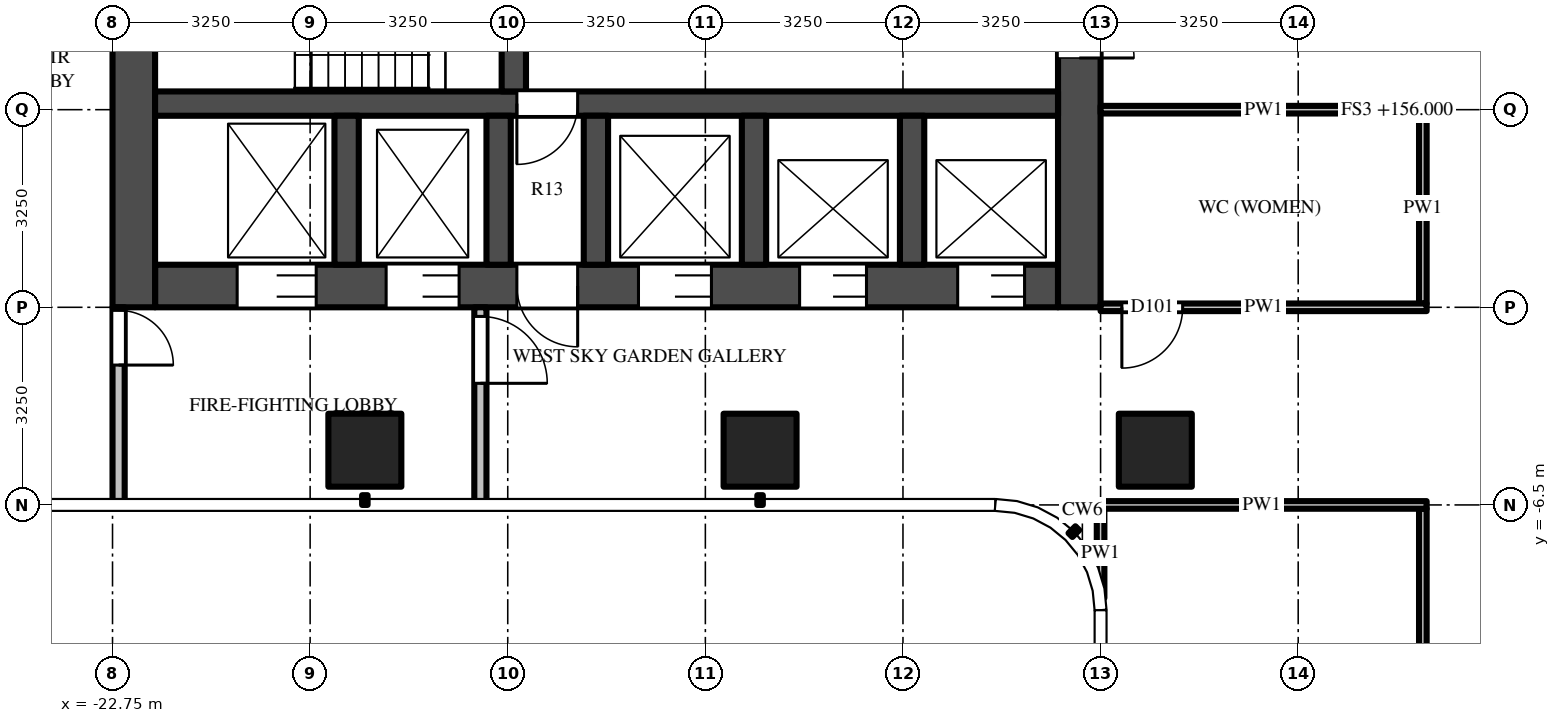
"""IFC4 building model, lengths in metres.
Left out: names, types, materials, properties, quantities, classifications, styles, units other than length and angle.
Written with IfcOpenShell. Run it as: python <this file> out.ifc"""

import sys

from ifc_helpers import new_model, si_unit, direction, frame, frame_2d, origin, origin_2d, place, context, subcontext, project, spatial, rectangle, extrude, source, transform, mapped, element, fill, save


model = new_model("IFC4")
c1 = context("Model", 3, precision=1e-05, world=origin(), true_north=direction((0.0, 1.0)))
c2 = subcontext(c1, "Body", "Model", "MODEL_VIEW")
j1 = project(units=[si_unit("LENGTHUNIT", "METRE"), si_unit("PLANEANGLEUNIT", "RADIAN")], contexts=[c1])
p1 = place(None, origin())
s1 = spatial("IfcSite", under=j1, at=p1, CompositionType="ELEMENT")
p2 = place(p1, origin())
s2 = spatial("IfcBuilding", under=s1, at=p2, CompositionType="ELEMENT")
p3 = place(p2, frame((0.0, 0.0, 156.0)))
s3 = spatial("IfcBuildingStorey", under=s2, at=p3, CompositionType="ELEMENT", Elevation=156.0)
m1 = source(origin(), c2, "Body", "SweptSolid", [
    extrude(rectangle(XDim=1.2, YDim=1.2, at=origin_2d()), origin(), (0.0, 0.0, 1.0), 6.0),
])
for number, where, z_axis, x_axis in (
    (1, (-5.6, -5.6, 0.0), (0.0, 0.0, 1.0), (1.0, 0.0, 0.0)),
    (2, (-12.1, -5.6, 0.0), (0.0, 0.0, 1.0), (1.0, 0.0, 0.0)),
    (3, (-18.6, -5.6, 0.0), (0.0, 0.0, 1.0), (1.0, 0.0, 0.0)),
):
    element("IfcColumn", number, at=place(p3, frame(where, z_axis=z_axis, x_axis=x_axis)), inside=s3, PredefinedType="COLUMN", context=c2, shape_type="MappedRepresentation", body=[
        mapped(m1, transform((0.0, 0.0, 0.0))),
    ])
m2 = source(origin(), c2, "Body", "SweptSolid", [
    extrude(rectangle(XDim=14.85, YDim=0.7, at=frame_2d((7.425, 0.0))), origin(), (0.0, 0.0, 1.0), 5.8),
])
p4 = place(p3, frame((-7.2, -2.9, 0.0), z_axis=(0.0, 0.0, 1.0), x_axis=(-1.0, 0.0, 0.0)))
e4 = element("IfcWall", 4, at=p4, inside=s3, PredefinedType="SHEAR", context=c2, shape_type="MappedRepresentation", body=[
    mapped(m2, transform((0.0, 0.0, 0.0))),
])
m3 = source(origin(), c2, "Body", "SweptSolid", [
    extrude(rectangle(XDim=1.1, YDim=2.1, at=frame_2d((0.55, 1.05))), frame((0.0, 0.36, 0.0), z_axis=(0.0, -1.0, 0.0), x_axis=(1.0, 0.0, 0.0)), (0.0, 0.0, 1.0), 0.72),
])
p5 = place(p4, frame((0.55, 0.0, 0.0)))
e5 = element("IfcOpeningElement", 5, at=p5, cuts=e4, PredefinedType="OPENING", context=c2, shape_type="MappedRepresentation", body=[
    mapped(m3, transform((0.0, 0.0, 0.0))),
])
p6 = place(p4, frame((3.15, 0.0, 0.0)))
e6 = element("IfcOpeningElement", 6, at=p6, cuts=e4, PredefinedType="OPENING", context=c2, shape_type="MappedRepresentation", body=[
    mapped(m3, transform((0.0, 0.0, 0.0))),
])
m4 = source(origin(), c2, "Body", "SweptSolid", [
    extrude(rectangle(XDim=1.2, YDim=2.1, at=frame_2d((0.6, 1.05))), frame((0.0, 0.36, 0.0), z_axis=(0.0, -1.0, 0.0), x_axis=(1.0, 0.0, 0.0)), (0.0, 0.0, 1.0), 0.72),
])
p7 = place(p4, frame((5.7, 0.0, 0.0)))
e7 = element("IfcOpeningElement", 7, at=p7, cuts=e4, PredefinedType="OPENING", context=c2, shape_type="MappedRepresentation", body=[
    mapped(m4, transform((0.0, 0.0, 0.0))),
])
m5 = source(origin(), c2, "Body", "SweptSolid", [
    extrude(rectangle(XDim=1.3, YDim=2.1, at=frame_2d((0.65, 1.05))), frame((0.0, 0.36, 0.0), z_axis=(0.0, -1.0, 0.0), x_axis=(1.0, 0.0, 0.0)), (0.0, 0.0, 1.0), 0.72),
])
p8 = place(p4, frame((12.2, 0.0, 0.0)))
e8 = element("IfcOpeningElement", 8, at=p8, cuts=e4, PredefinedType="OPENING", context=c2, shape_type="MappedRepresentation", body=[
    mapped(m5, transform((0.0, 0.0, 0.0))),
])
p9 = place(p4, frame((9.85, 0.0, 0.0)))
e9 = element("IfcOpeningElement", 9, at=p9, cuts=e4, PredefinedType="OPENING", context=c2, shape_type="MappedRepresentation", body=[
    mapped(m4, transform((0.0, 0.0, 0.0))),
])
m6 = source(origin(), c2, "Body", "SweptSolid", [
    extrude(rectangle(XDim=1.0, YDim=2.1, at=frame_2d((0.5, 1.05))), frame((0.0, 0.36, 0.0), z_axis=(0.0, -1.0, 0.0), x_axis=(1.0, 0.0, 0.0)), (0.0, 0.0, 1.0), 0.72),
])
p10 = place(p4, frame((7.9, 0.0, 0.0)))
e10 = element("IfcOpeningElement", 10, at=p10, cuts=e4, PredefinedType="OPENING", context=c2, shape_type="MappedRepresentation", body=[
    mapped(m6, transform((0.0, 0.0, 0.0))),
])
m7 = source(origin(), c2, "Body", "SweptSolid", [
    extrude(rectangle(XDim=9.05, YDim=0.7, at=frame_2d((4.525, 0.0))), origin(), (0.0, 0.0, 1.0), 5.8),
])
p11 = place(p3, frame((-6.85, 5.8, 0.0), z_axis=(0.0, 0.0, 1.0), x_axis=(0.0, -1.0, 0.0)))
e11 = element("IfcWall", 11, at=p11, inside=s3, PredefinedType="SHEAR", context=c2, shape_type="MappedRepresentation", body=[
    mapped(m7, transform((0.0, 0.0, 0.0))),
])
m8 = source(origin(), c2, "Body", "SweptSolid", [
    extrude(rectangle(XDim=1.8, YDim=2.1, at=frame_2d((0.9, 1.05))), frame((0.0, 0.36, 0.0), z_axis=(0.0, -1.0, 0.0), x_axis=(1.0, 0.0, 0.0)), (0.0, 0.0, 1.0), 0.72),
])
p12 = place(p11, frame((3.15, 0.0, 0.0)))
e12 = element("IfcOpeningElement", 12, at=p12, cuts=e11, PredefinedType="OPENING", context=c2, shape_type="MappedRepresentation", body=[
    mapped(m8, transform((0.0, 0.0, 0.0))),
])
p13 = place(p3, frame((-22.4, 5.8, 0.0), z_axis=(0.0, 0.0, 1.0), x_axis=(0.0, -1.0, 0.0)))
e13 = element("IfcWall", 13, at=p13, inside=s3, PredefinedType="SHEAR", context=c2, shape_type="MappedRepresentation", body=[
    mapped(m7, transform((0.0, 0.0, 0.0))),
])
m9 = source(origin(), c2, "Body", "SweptSolid", [
    extrude(rectangle(XDim=14.85, YDim=0.4, at=frame_2d((7.425, 0.0))), origin(), (0.0, 0.0, 1.0), 5.8),
])
p14 = place(p3, frame((-7.2, 0.1, 0.0), z_axis=(0.0, 0.0, 1.0), x_axis=(-1.0, 0.0, 0.0)))
e14 = element("IfcWall", 14, at=p14, inside=s3, PredefinedType="SHEAR", context=c2, shape_type="MappedRepresentation", body=[
    mapped(m9, transform((0.0, 0.0, 0.0))),
])
m10 = source(origin(), c2, "Body", "SweptSolid", [
    extrude(rectangle(XDim=1.0, YDim=2.1, at=frame_2d((0.5, 1.05))), frame((0.0, 0.21, 0.0), z_axis=(0.0, -1.0, 0.0), x_axis=(1.0, 0.0, 0.0)), (0.0, 0.0, 1.0), 0.42),
])
p15 = place(p14, frame((7.9, 0.0, 0.0)))
e15 = element("IfcOpeningElement", 15, at=p15, cuts=e14, PredefinedType="OPENING", context=c2, shape_type="MappedRepresentation", body=[
    mapped(m10, transform((0.0, 0.0, 0.0))),
])
m11 = source(origin(), c2, "Body", "SweptSolid", [
    extrude(rectangle(XDim=5.5, YDim=0.4, at=frame_2d((2.75, 0.0))), origin(), (0.0, 0.0, 1.0), 5.8),
])
p16 = place(p3, frame((-16.15, 5.8, 0.0), z_axis=(0.0, 0.0, 1.0), x_axis=(0.0, -1.0, 0.0)))
e16 = element("IfcWall", 16, at=p16, inside=s3, PredefinedType="SHEAR", context=c2, shape_type="MappedRepresentation", body=[
    mapped(m11, transform((0.0, 0.0, 0.0))),
])
m12 = source(origin(), c2, "Body", "SweptSolid", [
    extrude(rectangle(XDim=1.1, YDim=2.1, at=frame_2d((0.55, 1.05))), frame((0.0, 0.21, 0.0), z_axis=(0.0, -1.0, 0.0), x_axis=(1.0, 0.0, 0.0)), (0.0, 0.0, 1.0), 0.42),
])
p17 = place(p16, frame((0.725, 0.0, 0.0)))
e17 = element("IfcOpeningElement", 17, at=p17, cuts=e16, PredefinedType="OPENING", context=c2, shape_type="MappedRepresentation", body=[
    mapped(m12, transform((0.0, 0.0, 0.0))),
])
p18 = place(p16, frame((3.675, 0.0, 0.0)))
e18 = element("IfcOpeningElement", 18, at=p18, cuts=e16, PredefinedType="OPENING", context=c2, shape_type="MappedRepresentation", body=[
    mapped(m12, transform((0.0, 0.0, 0.0))),
])
m13 = source(origin(), c2, "Body", "SweptSolid", [
    extrude(rectangle(XDim=2.45, YDim=0.4, at=frame_2d((1.225, 0.0))), origin(), (0.0, 0.0, 1.0), 5.8),
])
for number, where, z_axis, x_axis in (
    (19, (-9.6, -0.1, 0.0), (0.0, 0.0, 1.0), (0.0, -1.0, 0.0)),
    (20, (-12.2, -0.1, 0.0), (0.0, 0.0, 1.0), (0.0, -1.0, 0.0)),
    (21, (-14.8, -0.1, 0.0), (0.0, 0.0, 1.0), (0.0, -1.0, 0.0)),
    (22, (-16.4, -0.1, 0.0), (0.0, 0.0, 1.0), (0.0, -1.0, 0.0)),
    (23, (-18.9, -0.1, 0.0), (0.0, 0.0, 1.0), (0.0, -1.0, 0.0)),
):
    element("IfcWall", number, at=place(p3, frame(where, z_axis=z_axis, x_axis=x_axis)), inside=s3, PredefinedType="SHEAR", context=c2, shape_type="MappedRepresentation", body=[
        mapped(m13, transform((0.0, 0.0, 0.0))),
    ])
m14 = source(origin(), c2, "Body", "SweptSolid", [
    extrude(rectangle(XDim=3.25, YDim=0.2, at=frame_2d((1.625, 0.0))), origin(), (0.0, 0.0, 1.0), 5.8),
])
p19 = place(p3, frame((-16.7, -3.25, 0.0), z_axis=(0.0, 0.0, 1.0), x_axis=(0.0, -1.0, 0.0)))
e24 = element("IfcWall", 24, at=p19, inside=s3, PredefinedType="PARTITIONING", context=c2, shape_type="MappedRepresentation", body=[
    mapped(m14, transform((0.0, 0.0, 0.0))),
])
m15 = source(origin(), c2, "Body", "SweptSolid", [
    extrude(rectangle(XDim=1.1, YDim=2.1, at=frame_2d((0.55, 1.05))), frame((0.0, 0.11, 0.0), z_axis=(0.0, -1.0, 0.0), x_axis=(1.0, 0.0, 0.0)), (0.0, 0.0, 1.0), 0.22),
])
p20 = place(p19, frame((0.15, 0.0, 0.0)))
e25 = element("IfcOpeningElement", 25, at=p20, cuts=e24, PredefinedType="OPENING", context=c2, shape_type="MappedRepresentation", body=[
    mapped(m15, transform((0.0, 0.0, 0.0))),
])
p21 = place(p3, frame((-22.65, -3.25, 0.0), z_axis=(0.0, 0.0, 1.0), x_axis=(0.0, -1.0, 0.0)))
e26 = element("IfcWall", 26, at=p21, inside=s3, PredefinedType="PARTITIONING", context=c2, shape_type="MappedRepresentation", body=[
    mapped(m14, transform((0.0, 0.0, 0.0))),
])
m16 = source(origin(), c2, "Body", "SweptSolid", [
    extrude(rectangle(XDim=0.9, YDim=2.1, at=frame_2d((0.45, 1.05))), frame((0.0, 0.11, 0.0), z_axis=(0.0, -1.0, 0.0), x_axis=(1.0, 0.0, 0.0)), (0.0, 0.0, 1.0), 0.22),
])
p22 = place(p21, frame((0.05, 0.0, 0.0)))
e27 = element("IfcOpeningElement", 27, at=p22, cuts=e26, PredefinedType="OPENING", context=c2, shape_type="MappedRepresentation", body=[
    mapped(m16, transform((0.0, 0.0, 0.0))),
])
m17 = source(origin(), c2, "Body", "SweptSolid", [
    extrude(rectangle(XDim=1.469, YDim=0.125, at=frame_2d((0.734, 0.0))), origin(), (0.0, 0.0, 1.0), 5.8),
])
p23 = place(p3, frame((-6.5, -6.562, 0.0), z_axis=(0.0, 0.0, 1.0), x_axis=(0.0, -1.0, 0.0)))
e28 = element("IfcWall", 28, at=p23, inside=s3, PredefinedType="PARTITIONING", context=c2, shape_type="MappedRepresentation", body=[
    mapped(m17, transform((0.0, 0.0, 0.0))),
])
m18 = source(origin(), c2, "Body", "SweptSolid", [
    extrude(rectangle(XDim=3.125, YDim=0.125, at=frame_2d((1.562, 0.0))), origin(), (0.0, 0.0, 1.0), 5.168),
])
p24 = place(p3, frame((-1.2, -0.062, 0.0), z_axis=(0.0, 0.0, 1.0), x_axis=(0.0, -1.0, 0.0)))
e29 = element("IfcWall", 29, at=p24, inside=s3, PredefinedType="PARTITIONING", context=c2, shape_type="MappedRepresentation", body=[
    mapped(m18, transform((0.0, 0.0, 0.0))),
])
p25 = place(p3, frame((-1.2, -12.038, 0.0), z_axis=(0.0, 0.0, 1.0), x_axis=(0.0, 1.0, 0.0)))
e30 = element("IfcWall", 30, at=p25, inside=s3, PredefinedType="PARTITIONING", context=c2, shape_type="SweptSolid", body=[
    extrude(rectangle(XDim=5.475, YDim=0.125, at=frame_2d((2.738, 0.0))), origin(), (0.0, 0.0, 1.0), 5.097),
])
m19 = source(origin(), c2, "Body", "SweptSolid", [
    extrude(rectangle(XDim=1.0, YDim=2.1, at=frame_2d((0.5, 1.05))), frame((0.0, 0.073, 0.0), z_axis=(0.0, -1.0, 0.0), x_axis=(1.0, 0.0, 0.0)), (0.0, 0.0, 1.0), 0.145),
])
p26 = place(p25, frame((0.288, 0.0, 0.0)))
e31 = element("IfcOpeningElement", 31, at=p26, cuts=e30, PredefinedType="OPENING", context=c2, shape_type="MappedRepresentation", body=[
    mapped(m19, transform((0.0, 0.0, 0.0))),
])
p27 = place(p3, frame((-1.137, -6.5, 0.0), z_axis=(0.0, 0.0, 1.0), x_axis=(-1.0, 0.0, 0.0)))
e32 = element("IfcWall", 32, at=p27, inside=s3, PredefinedType="PARTITIONING", context=c2, shape_type="SweptSolid", body=[
    extrude(rectangle(XDim=5.425, YDim=0.125, at=frame_2d((2.712, 0.0))), origin(), (0.0, 0.0, 1.0), 4.88),
])
m20 = source(origin(), c2, "Body", "SweptSolid", [
    extrude(rectangle(XDim=5.363, YDim=0.125, at=frame_2d((2.681, 0.0))), origin(), (0.0, 0.0, 1.0), 5.097),
])
p28 = place(p3, frame((-1.137, -3.25, 0.0), z_axis=(0.0, 0.0, 1.0), x_axis=(-1.0, 0.0, 0.0)))
e33 = element("IfcWall", 33, at=p28, inside=s3, PredefinedType="PARTITIONING", context=c2, shape_type="MappedRepresentation", body=[
    mapped(m20, transform((0.0, 0.0, 0.0))),
])
p29 = place(p28, frame((4.012, 0.0, 0.0)))
e34 = element("IfcOpeningElement", 34, at=p29, cuts=e33, PredefinedType="OPENING", context=c2, shape_type="MappedRepresentation", body=[
    mapped(m19, transform((0.0, 0.0, 0.0))),
])
p30 = place(p3, frame((-1.137, 0.0, 0.0), z_axis=(0.0, 0.0, 1.0), x_axis=(-1.0, 0.0, 0.0)))
e35 = element("IfcWall", 35, at=p30, inside=s3, PredefinedType="PARTITIONING", context=c2, shape_type="MappedRepresentation", body=[
    mapped(m20, transform((0.0, 0.0, 0.0))),
])
m21 = source(origin(), c2, "Body", "SweptSolid", [
    extrude(rectangle(XDim=1.1, YDim=2.1, at=frame_2d((0.55, 1.05))), frame((0.0, -0.275, 0.0), z_axis=(0.0, -1.0, 0.0), x_axis=(1.0, 0.0, 0.0)), (0.0, 0.0, 1.0), 0.05),
])
p31 = place(p5, origin())
e36 = element("IfcDoor", 36, at=p31, inside=s3, OperationType="DOUBLE_DOOR_SLIDING", PredefinedType="DOOR", context=c2, shape_type="MappedRepresentation", body=[
    mapped(m21, transform((0.0, 0.0, 0.0))),
])
fill(e5, e36)
p32 = place(p6, origin())
e37 = element("IfcDoor", 37, at=p32, inside=s3, OperationType="DOUBLE_DOOR_SLIDING", PredefinedType="DOOR", context=c2, shape_type="MappedRepresentation", body=[
    mapped(m21, transform((0.0, 0.0, 0.0))),
])
fill(e6, e37)
m22 = source(origin(), c2, "Body", "SweptSolid", [
    extrude(rectangle(XDim=1.2, YDim=2.1, at=frame_2d((0.6, 1.05))), frame((0.0, -0.275, 0.0), z_axis=(0.0, -1.0, 0.0), x_axis=(1.0, 0.0, 0.0)), (0.0, 0.0, 1.0), 0.05),
])
p33 = place(p7, origin())
e38 = element("IfcDoor", 38, at=p33, inside=s3, OperationType="DOUBLE_DOOR_SLIDING", PredefinedType="DOOR", context=c2, shape_type="MappedRepresentation", body=[
    mapped(m22, transform((0.0, 0.0, 0.0))),
])
fill(e7, e38)
m23 = source(origin(), c2, "Body", "SweptSolid", [
    extrude(rectangle(XDim=1.3, YDim=2.1, at=frame_2d((0.65, 1.05))), frame((0.0, -0.275, 0.0), z_axis=(0.0, -1.0, 0.0), x_axis=(1.0, 0.0, 0.0)), (0.0, 0.0, 1.0), 0.05),
])
p34 = place(p8, origin())
e39 = element("IfcDoor", 39, at=p34, inside=s3, OperationType="DOUBLE_DOOR_SLIDING", PredefinedType="DOOR", context=c2, shape_type="MappedRepresentation", body=[
    mapped(m23, transform((0.0, 0.0, 0.0))),
])
fill(e8, e39)
p35 = place(p9, origin())
e40 = element("IfcDoor", 40, at=p35, inside=s3, OperationType="DOUBLE_DOOR_SLIDING", PredefinedType="DOOR", context=c2, shape_type="MappedRepresentation", body=[
    mapped(m22, transform((0.0, 0.0, 0.0))),
])
fill(e9, e40)
m24 = source(origin(), c2, "Body", "SweptSolid", [
    extrude(rectangle(XDim=1.8, YDim=2.1, at=frame_2d((0.9, 1.05))), frame((0.0, -0.275, 0.0), z_axis=(0.0, -1.0, 0.0), x_axis=(1.0, 0.0, 0.0)), (0.0, 0.0, 1.0), 0.05),
])
p36 = place(p12, origin())
e41 = element("IfcDoor", 41, at=p36, inside=s3, OperationType="DOUBLE_DOOR_SINGLE_SWING", PredefinedType="DOOR", context=c2, shape_type="MappedRepresentation", body=[
    mapped(m24, transform((0.0, 0.0, 0.0))),
])
fill(e12, e41)
m25 = source(origin(), c2, "Body", "SweptSolid", [
    extrude(rectangle(XDim=1.0, YDim=2.1, at=frame_2d((0.5, 1.05))), frame((0.0, 0.025, 0.0), z_axis=(0.0, -1.0, 0.0), x_axis=(1.0, 0.0, 0.0)), (0.0, 0.0, 1.0), 0.05),
])
p37 = place(p15, origin())
e42 = element("IfcDoor", 42, at=p37, inside=s3, OperationType="SINGLE_SWING_RIGHT", PredefinedType="DOOR", context=c2, shape_type="MappedRepresentation", body=[
    mapped(m25, transform((0.0, 0.0, 0.0))),
])
fill(e15, e42)
m26 = source(origin(), c2, "Body", "SweptSolid", [
    extrude(rectangle(XDim=1.0, YDim=2.1, at=frame_2d((0.5, 1.05))), frame((0.0, -0.275, 0.0), z_axis=(0.0, -1.0, 0.0), x_axis=(1.0, 0.0, 0.0)), (0.0, 0.0, 1.0), 0.05),
])
p38 = place(p10, origin())
e43 = element("IfcDoor", 43, at=p38, inside=s3, OperationType="SINGLE_SWING_LEFT", PredefinedType="DOOR", context=c2, shape_type="MappedRepresentation", body=[
    mapped(m26, transform((0.0, 0.0, 0.0))),
])
fill(e10, e43)
m27 = source(origin(), c2, "Body", "SweptSolid", [
    extrude(rectangle(XDim=1.1, YDim=2.1, at=frame_2d((0.55, 1.05))), frame((0.0, 0.025, 0.0), z_axis=(0.0, -1.0, 0.0), x_axis=(1.0, 0.0, 0.0)), (0.0, 0.0, 1.0), 0.05),
])
p39 = place(p20, origin())
e44 = element("IfcDoor", 44, at=p39, inside=s3, OperationType="SINGLE_SWING_RIGHT", PredefinedType="DOOR", context=c2, shape_type="MappedRepresentation", body=[
    mapped(m27, transform((0.0, 0.0, 0.0))),
])
fill(e25, e44)
m28 = source(origin(), c2, "Body", "SweptSolid", [
    extrude(rectangle(XDim=0.9, YDim=2.1, at=frame_2d((0.45, 1.05))), frame((0.0, 0.025, 0.0), z_axis=(0.0, -1.0, 0.0), x_axis=(1.0, 0.0, 0.0)), (0.0, 0.0, 1.0), 0.05),
])
p40 = place(p22, origin())
e45 = element("IfcDoor", 45, at=p40, inside=s3, OperationType="SINGLE_SWING_RIGHT", PredefinedType="DOOR", context=c2, shape_type="MappedRepresentation", body=[
    mapped(m28, transform((0.0, 0.0, 0.0))),
])
fill(e27, e45)
p41 = place(p29, origin())
e46 = element("IfcDoor", 46, at=p41, inside=s3, OperationType="SINGLE_SWING_RIGHT", PredefinedType="DOOR", context=c2, shape_type="MappedRepresentation", body=[
    mapped(m25, transform((0.0, 0.0, 0.0))),
])
fill(e34, e46)
save(model, sys.argv[1])
